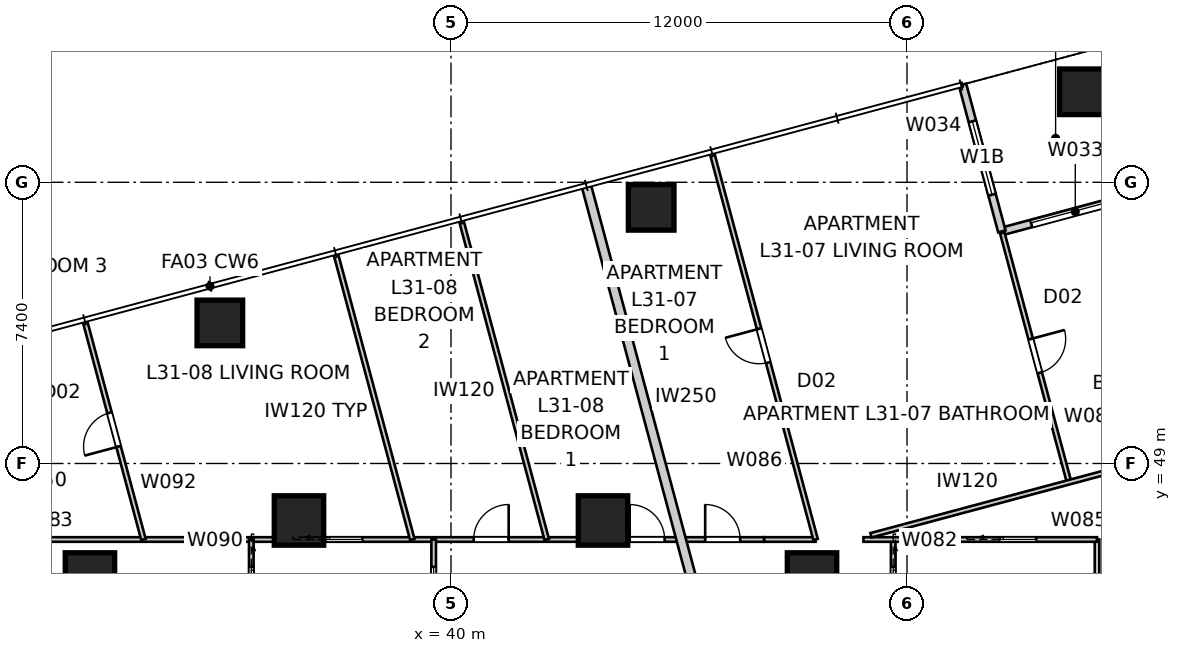
"""IFC4 building model, lengths in metres.
Left out: names, types, materials, properties, quantities, classifications, styles, units other than length and angle.
Written with IfcOpenShell. Run it as: python <this file> out.ifc"""

import sys

from ifc_helpers import new_model, si_unit, direction, frame, frame_2d, origin, origin_2d, place, context, subcontext, project, spatial, rectangle, extrude, element, fill, save


model = new_model("IFC4")
c1 = context("Model", 3, precision=1e-05, world=origin(), true_north=direction((0.0, 1.0)))
c2 = subcontext(c1, "Body", "Model", "MODEL_VIEW")
j1 = project(units=[si_unit("LENGTHUNIT", "METRE"), si_unit("PLANEANGLEUNIT", "RADIAN")], contexts=[c1])
p1 = place(None, origin())
s1 = spatial("IfcSite", under=j1, at=p1, CompositionType="ELEMENT")
p2 = place(p1, origin())
s2 = spatial("IfcBuilding", under=s1, at=p2, CompositionType="ELEMENT")
p3 = place(p2, frame((0.0, 0.0, 115.0)))
s3 = spatial("IfcBuildingStorey", under=s2, at=p3, CompositionType="ELEMENT", Elevation=115.0)
for number, where, z_axis, x_axis in (
    (1, (56.617, 58.781, 0.0), (0.0, 0.0, 1.0), (1.0, 0.0, 0.0)),
    (2, (45.267, 55.74, 0.0), (0.0, 0.0, 1.0), (1.0, 0.0, 0.0)),
    (3, (33.918, 52.699, 0.0), (0.0, 0.0, 1.0), (1.0, 0.0, 0.0)),
):
    element("IfcColumn", number, at=place(p3, frame(where, z_axis=z_axis, x_axis=x_axis)), inside=s3, PredefinedType="COLUMN", context=c2, shape_type="SweptSolid", body=[
        extrude(rectangle(XDim=1.2, YDim=1.2, at=origin_2d()), origin(), (0.0, 0.0, 1.0), 3.4),
    ])
for number, where, z_axis, x_axis in (
    (4, (49.5, 46.0, 0.0), (0.0, 0.0, 1.0), (1.0, 0.0, 0.0)),
    (5, (44.0, 47.5, 0.0), (0.0, 0.0, 1.0), (1.0, 0.0, 0.0)),
    (6, (36.0, 47.5, 0.0), (0.0, 0.0, 1.0), (1.0, 0.0, 0.0)),
    (7, (30.5, 46.0, 0.0), (0.0, 0.0, 1.0), (1.0, 0.0, 0.0)),
):
    element("IfcColumn", number, at=place(p3, frame(where, z_axis=z_axis, x_axis=x_axis)), inside=s3, PredefinedType="COLUMN", context=c2, shape_type="SweptSolid", body=[
        extrude(rectangle(XDim=1.3, YDim=1.3, at=origin_2d()), origin(), (0.0, 0.0, 1.0), 3.4),
    ])
p4 = place(p3, frame((58.359, 56.143, 0.0), z_axis=(0.0, 0.0, 1.0), x_axis=(-0.965919172068, -0.258843877716, 0.0)))
e8 = element("IfcWall", 8, at=p4, inside=s3, PredefinedType="SOLIDWALL", context=c2, shape_type="SweptSolid", body=[
    extrude(rectangle(XDim=4.0, YDim=0.2, at=frame_2d((2.0, 0.0))), origin(), (0.0, 0.0, 1.0), 3.25),
])
p5 = place(p4, frame((0.8, 0.0, 0.0)))
e9 = element("IfcOpeningElement", 9, at=p5, cuts=e8, PredefinedType="OPENING", context=c2, shape_type="SweptSolid", body=[
    extrude(rectangle(XDim=2.4, YDim=2.1, at=frame_2d((1.2, 1.05))), frame((0.0, 0.11, 0.0), z_axis=(0.0, -1.0, 0.0), x_axis=(1.0, 0.0, 0.0)), (0.0, 0.0, 1.0), 0.22),
])
p6 = place(p3, frame((54.496, 55.107, 0.0), z_axis=(0.0, 0.0, 1.0), x_axis=(-0.258786931944, 0.965934430412, 0.0)))
e10 = element("IfcWall", 10, at=p6, inside=s3, PredefinedType="SOLIDWALL", context=c2, shape_type="SweptSolid", body=[
    extrude(rectangle(XDim=4.0, YDim=0.2, at=frame_2d((2.0, 0.0))), origin(), (0.0, 0.0, 1.0), 3.25),
])
p7 = place(p6, frame((1.0, 0.0, 0.45)))
e11 = element("IfcOpeningElement", 11, at=p7, cuts=e10, PredefinedType="OPENING", context=c2, shape_type="SweptSolid", body=[
    extrude(rectangle(XDim=2.0, YDim=1.8, at=frame_2d((1.0, 0.9))), frame((0.0, 0.11, 0.0), z_axis=(0.0, -1.0, 0.0), x_axis=(1.0, 0.0, 0.0)), (0.0, 0.0, 1.0), 0.22),
])
p8 = place(p3, frame((43.56, 56.318, 0.0), z_axis=(0.0, 0.0, 1.0), x_axis=(0.258824223352, -0.965924438766, 0.0)))
e12 = element("IfcWall", 12, at=p8, inside=s3, PredefinedType="PARTITIONING", context=c2, shape_type="SweptSolid", body=[
    extrude(rectangle(XDim=12.138, YDim=0.25, at=frame_2d((6.069, 0.0))), origin(), (0.0, 0.0, 1.0), 3.25),
])
p9 = place(p3, frame((61.012, 46.242, 0.0), z_axis=(0.0, 0.0, 1.0), x_axis=(-0.965929355837, -0.25880587229, 0.0)))
e13 = element("IfcWall", 13, at=p9, inside=s3, PredefinedType="PARTITIONING", context=c2, shape_type="SweptSolid", body=[
    extrude(rectangle(XDim=6.645, YDim=0.25, at=frame_2d((3.322, 0.0))), origin(), (0.0, 0.0, 1.0), 3.25),
])
p10 = place(p3, frame((57.0, 47.0, 0.0), z_axis=(0.0, 0.0, 1.0), x_axis=(0.0, -1.0, 0.0)))
e14 = element("IfcWall", 14, at=p10, inside=s3, PredefinedType="PARTITIONING", context=c2, shape_type="SweptSolid", body=[
    extrude(rectangle(XDim=34.0, YDim=0.12, at=frame_2d((17.0, 0.0))), origin(), (0.0, 0.0, 1.0), 2.55),
])
p11 = place(p10, frame((8.23, 0.0, 0.0)))
e15 = element("IfcOpeningElement", 15, at=p11, cuts=e14, PredefinedType="OPENING", context=c2, shape_type="SweptSolid", body=[
    extrude(rectangle(XDim=0.92, YDim=2.34, at=frame_2d((0.46, 1.17))), frame((0.0, 0.07, 0.0), z_axis=(0.0, -1.0, 0.0), x_axis=(1.0, 0.0, 0.0)), (0.0, 0.0, 1.0), 0.14),
])
p12 = place(p10, frame((3.192, 0.0, 0.0)))
e16 = element("IfcOpeningElement", 16, at=p12, cuts=e14, PredefinedType="OPENING", context=c2, shape_type="SweptSolid", body=[
    extrude(rectangle(XDim=0.92, YDim=2.34, at=frame_2d((0.46, 1.17))), frame((0.0, 0.07, 0.0), z_axis=(0.0, -1.0, 0.0), x_axis=(1.0, 0.0, 0.0)), (0.0, 0.0, 1.0), 0.14),
])
p13 = place(p10, frame((24.391, 0.0, 0.0)))
e17 = element("IfcOpeningElement", 17, at=p13, cuts=e14, PredefinedType="OPENING", context=c2, shape_type="SweptSolid", body=[
    extrude(rectangle(XDim=0.92, YDim=2.34, at=frame_2d((0.46, 1.17))), frame((0.0, 0.07, 0.0), z_axis=(0.0, -1.0, 0.0), x_axis=(1.0, 0.0, 0.0)), (0.0, 0.0, 1.0), 0.14),
])
p14 = place(p10, frame((21.702, 0.0, 0.0)))
e18 = element("IfcOpeningElement", 18, at=p14, cuts=e14, PredefinedType="OPENING", context=c2, shape_type="SweptSolid", body=[
    extrude(rectangle(XDim=0.92, YDim=2.34, at=frame_2d((0.46, 1.17))), frame((0.0, 0.07, 0.0), z_axis=(0.0, -1.0, 0.0), x_axis=(1.0, 0.0, 0.0)), (0.0, 0.0, 1.0), 0.14),
])
p15 = place(p10, frame((31.459, 0.0, 0.0)))
e19 = element("IfcOpeningElement", 19, at=p15, cuts=e14, PredefinedType="OPENING", context=c2, shape_type="SweptSolid", body=[
    extrude(rectangle(XDim=0.96, YDim=2.1, at=frame_2d((0.48, 1.05))), frame((0.0, 0.07, 0.0), z_axis=(0.0, -1.0, 0.0), x_axis=(1.0, 0.0, 0.0)), (0.0, 0.0, 1.0), 0.14),
])
p16 = place(p10, frame((13.759, 0.0, 0.0)))
e20 = element("IfcOpeningElement", 20, at=p16, cuts=e14, PredefinedType="OPENING", context=c2, shape_type="SweptSolid", body=[
    extrude(rectangle(XDim=0.96, YDim=2.1, at=frame_2d((0.48, 1.05))), frame((0.0, 0.07, 0.0), z_axis=(0.0, -1.0, 0.0), x_axis=(1.0, 0.0, 0.0)), (0.0, 0.0, 1.0), 0.14),
])
p17 = place(p3, frame((51.636, 47.0, 0.0), z_axis=(0.0, 0.0, 1.0), x_axis=(0.0, -1.0, 0.0)))
e21 = element("IfcWall", 21, at=p17, inside=s3, PredefinedType="PARTITIONING", context=c2, shape_type="SweptSolid", body=[
    extrude(rectangle(XDim=2.4, YDim=0.12, at=frame_2d((1.2, 0.0))), origin(), (0.0, 0.0, 1.0), 3.25),
])
p18 = place(p17, frame((0.72, 0.0, 0.0)))
e22 = element("IfcOpeningElement", 22, at=p18, cuts=e21, PredefinedType="OPENING", context=c2, shape_type="SweptSolid", body=[
    extrude(rectangle(XDim=0.96, YDim=2.1, at=frame_2d((0.48, 1.05))), frame((0.0, 0.07, 0.0), z_axis=(0.0, -1.0, 0.0), x_axis=(1.0, 0.0, 0.0)), (0.0, 0.0, 1.0), 0.14),
])
p19 = place(p3, frame((23.0, 47.0, 0.0), z_axis=(0.0, 0.0, 1.0), x_axis=(1.0, 0.0, 0.0)))
e23 = element("IfcWall", 23, at=p19, inside=s3, PredefinedType="PARTITIONING", context=c2, shape_type="SweptSolid", body=[
    extrude(rectangle(XDim=25.241, YDim=0.12, at=frame_2d((12.62, 0.0))), origin(), (0.0, 0.0, 1.0), 2.55),
])
p20 = place(p19, frame((21.702, 0.0, 0.0)))
e24 = element("IfcOpeningElement", 24, at=p20, cuts=e23, PredefinedType="OPENING", context=c2, shape_type="SweptSolid", body=[
    extrude(rectangle(XDim=0.92, YDim=2.34, at=frame_2d((0.46, 1.17))), frame((0.0, 0.07, 0.0), z_axis=(0.0, -1.0, 0.0), x_axis=(1.0, 0.0, 0.0)), (0.0, 0.0, 1.0), 0.14),
])
p21 = place(p19, frame((17.598, 0.0, 0.0)))
e25 = element("IfcOpeningElement", 25, at=p21, cuts=e23, PredefinedType="OPENING", context=c2, shape_type="SweptSolid", body=[
    extrude(rectangle(XDim=0.92, YDim=2.34, at=frame_2d((0.46, 1.17))), frame((0.0, 0.07, 0.0), z_axis=(0.0, -1.0, 0.0), x_axis=(1.0, 0.0, 0.0)), (0.0, 0.0, 1.0), 0.14),
])
p22 = place(p19, frame((23.689, 0.0, 0.0)))
e26 = element("IfcOpeningElement", 26, at=p22, cuts=e23, PredefinedType="OPENING", context=c2, shape_type="SweptSolid", body=[
    extrude(rectangle(XDim=0.92, YDim=2.34, at=frame_2d((0.46, 1.17))), frame((0.0, 0.07, 0.0), z_axis=(0.0, -1.0, 0.0), x_axis=(1.0, 0.0, 0.0)), (0.0, 0.0, 1.0), 0.14),
])
p23 = place(p19, frame((2.225, 0.0, 0.0)))
e27 = element("IfcOpeningElement", 27, at=p23, cuts=e23, PredefinedType="OPENING", context=c2, shape_type="SweptSolid", body=[
    extrude(rectangle(XDim=0.92, YDim=2.34, at=frame_2d((0.46, 1.17))), frame((0.0, 0.07, 0.0), z_axis=(0.0, -1.0, 0.0), x_axis=(1.0, 0.0, 0.0)), (0.0, 0.0, 1.0), 0.14),
])
p24 = place(p19, frame((13.709, 0.0, 0.0)))
e28 = element("IfcOpeningElement", 28, at=p24, cuts=e23, PredefinedType="OPENING", context=c2, shape_type="SweptSolid", body=[
    extrude(rectangle(XDim=0.96, YDim=2.1, at=frame_2d((0.48, 1.05))), frame((0.0, 0.07, 0.0), z_axis=(0.0, -1.0, 0.0), x_axis=(1.0, 0.0, 0.0)), (0.0, 0.0, 1.0), 0.14),
])
p25 = place(p3, frame((50.853, 47.0, 0.0), z_axis=(0.0, 0.0, 1.0), x_axis=(1.0, 0.0, 0.0)))
e29 = element("IfcWall", 29, at=p25, inside=s3, PredefinedType="PARTITIONING", context=c2, shape_type="SweptSolid", body=[
    extrude(rectangle(XDim=6.147, YDim=0.12, at=frame_2d((3.074, 0.0))), origin(), (0.0, 0.0, 1.0), 3.25),
])
p26 = place(p25, frame((3.585, 0.0, 0.0)))
e30 = element("IfcOpeningElement", 30, at=p26, cuts=e29, PredefinedType="OPENING", context=c2, shape_type="SweptSolid", body=[
    extrude(rectangle(XDim=0.96, YDim=2.1, at=frame_2d((0.48, 1.05))), frame((0.0, 0.07, 0.0), z_axis=(0.0, -1.0, 0.0), x_axis=(1.0, 0.0, 0.0)), (0.0, 0.0, 1.0), 0.14),
])
p27 = place(p3, frame((49.594, 47.0, 0.0), z_axis=(0.0, 0.0, 1.0), x_axis=(-0.258797552287, 0.965931585015, 0.0)))
e31 = element("IfcWall", 31, at=p27, inside=s3, PredefinedType="PARTITIONING", context=c2, shape_type="SweptSolid", body=[
    extrude(rectangle(XDim=10.522, YDim=0.12, at=frame_2d((5.261, 0.0))), origin(), (0.0, 0.0, 1.0), 2.722),
])
p28 = place(p27, frame((4.821, 0.0, 0.0)))
e32 = element("IfcOpeningElement", 32, at=p28, cuts=e31, PredefinedType="OPENING", context=c2, shape_type="SweptSolid", body=[
    extrude(rectangle(XDim=0.92, YDim=2.34, at=frame_2d((0.46, 1.17))), frame((0.0, 0.07, 0.0), z_axis=(0.0, -1.0, 0.0), x_axis=(1.0, 0.0, 0.0)), (0.0, 0.0, 1.0), 0.14),
])
p29 = place(p3, frame((54.506, 55.069, 0.0), z_axis=(0.0, 0.0, 1.0), x_axis=(0.258830095464, -0.965922865286, 0.0)))
e33 = element("IfcWall", 33, at=p29, inside=s3, PredefinedType="PARTITIONING", context=c2, shape_type="SweptSolid", body=[
    extrude(rectangle(XDim=6.793, YDim=0.12, at=frame_2d((3.396, 0.0))), origin(), (0.0, 0.0, 1.0), 3.25),
])
p30 = place(p29, frame((2.892, 0.0, 0.0)))
e34 = element("IfcOpeningElement", 34, at=p30, cuts=e33, PredefinedType="OPENING", context=c2, shape_type="SweptSolid", body=[
    extrude(rectangle(XDim=0.92, YDim=2.34, at=frame_2d((0.46, 1.17))), frame((0.0, 0.07, 0.0), z_axis=(0.0, -1.0, 0.0), x_axis=(1.0, 0.0, 0.0)), (0.0, 0.0, 1.0), 0.14),
])
p31 = place(p3, frame((60.089, 49.532, 0.0), z_axis=(0.0, 0.0, 1.0), x_axis=(-0.965927203676, -0.25881390457, 0.0)))
e35 = element("IfcWall", 35, at=p31, inside=s3, PredefinedType="PARTITIONING", context=c2, shape_type="SweptSolid", body=[
    extrude(rectangle(XDim=9.357, YDim=0.12, at=frame_2d((4.678, 0.0))), origin(), (0.0, 0.0, 1.0), 2.638),
])
p32 = place(p3, frame((39.544, 44.6, 0.0), z_axis=(0.0, 0.0, 1.0), x_axis=(0.0, 1.0, 0.0)))
e36 = element("IfcWall", 36, at=p32, inside=s3, PredefinedType="PARTITIONING", context=c2, shape_type="SweptSolid", body=[
    extrude(rectangle(XDim=2.4, YDim=0.12, at=frame_2d((1.2, 0.0))), origin(), (0.0, 0.0, 1.0), 3.25),
])
p33 = place(p32, frame((0.72, 0.0, 0.0)))
e37 = element("IfcOpeningElement", 37, at=p33, cuts=e36, PredefinedType="OPENING", context=c2, shape_type="SweptSolid", body=[
    extrude(rectangle(XDim=0.96, YDim=2.1, at=frame_2d((0.48, 1.05))), frame((0.0, 0.07, 0.0), z_axis=(0.0, -1.0, 0.0), x_axis=(1.0, 0.0, 0.0)), (0.0, 0.0, 1.0), 0.14),
])
p34 = place(p3, frame((34.745, 47.0, 0.0), z_axis=(0.0, 0.0, 1.0), x_axis=(0.0, -1.0, 0.0)))
e38 = element("IfcWall", 38, at=p34, inside=s3, PredefinedType="PARTITIONING", context=c2, shape_type="SweptSolid", body=[
    extrude(rectangle(XDim=2.4, YDim=0.12, at=frame_2d((1.2, 0.0))), origin(), (0.0, 0.0, 1.0), 3.25),
])
p35 = place(p34, frame((0.72, 0.0, 0.0)))
e39 = element("IfcOpeningElement", 39, at=p35, cuts=e38, PredefinedType="OPENING", context=c2, shape_type="SweptSolid", body=[
    extrude(rectangle(XDim=0.96, YDim=2.1, at=frame_2d((0.48, 1.05))), frame((0.0, 0.07, 0.0), z_axis=(0.0, -1.0, 0.0), x_axis=(1.0, 0.0, 0.0)), (0.0, 0.0, 1.0), 0.14),
])
p36 = place(p3, frame((36.969, 54.511, 0.0), z_axis=(0.0, 0.0, 1.0), x_axis=(0.258813509689, -0.965927309482, 0.0)))
e40 = element("IfcWall", 40, at=p36, inside=s3, PredefinedType="PARTITIONING", context=c2, shape_type="SweptSolid", body=[
    extrude(rectangle(XDim=7.776, YDim=0.12, at=frame_2d((3.888, 0.0))), origin(), (0.0, 0.0, 1.0), 3.25),
])
p37 = place(p3, frame((31.908, 47.0, 0.0), z_axis=(0.0, 0.0, 1.0), x_axis=(-0.258812722515, 0.965927520399, 0.0)))
e41 = element("IfcWall", 41, at=p37, inside=s3, PredefinedType="PARTITIONING", context=c2, shape_type="SweptSolid", body=[
    extrude(rectangle(XDim=5.945, YDim=0.12, at=frame_2d((2.972, 0.0))), origin(), (0.0, 0.0, 1.0), 3.25),
])
p38 = place(p37, frame((2.532, 0.0, 0.0)))
e42 = element("IfcOpeningElement", 42, at=p38, cuts=e41, PredefinedType="OPENING", context=c2, shape_type="SweptSolid", body=[
    extrude(rectangle(XDim=0.92, YDim=2.34, at=frame_2d((0.46, 1.17))), frame((0.0, 0.07, 0.0), z_axis=(0.0, -1.0, 0.0), x_axis=(1.0, 0.0, 0.0)), (0.0, 0.0, 1.0), 0.14),
])
p39 = place(p3, frame((42.519, 47.0, 0.0), z_axis=(0.0, 0.0, 1.0), x_axis=(-0.258819860698, 0.965925607751, 0.0)))
e43 = element("IfcWall", 43, at=p39, inside=s3, PredefinedType="PARTITIONING", context=c2, shape_type="SweptSolid", body=[
    extrude(rectangle(XDim=8.691, YDim=0.12, at=frame_2d((4.346, 0.0))), origin(), (0.0, 0.0, 1.0), 3.25),
])
p40 = place(p3, frame((48.241, 47.0, 0.0), z_axis=(0.0, 0.0, 1.0), x_axis=(1.0, 0.0, 0.0)))
e44 = element("IfcWall", 44, at=p40, inside=s3, PredefinedType="PARTITIONING", context=c2, shape_type="SweptSolid", body=[
    extrude(rectangle(XDim=1.353, YDim=0.12, at=frame_2d((0.676, 0.0))), origin(), (0.0, 0.0, 1.0), 3.25),
])
p41 = place(p5, origin())
e45 = element("IfcDoor", 45, at=p41, inside=s3, OperationType="SLIDING_TO_LEFT", PredefinedType="DOOR", context=c2, shape_type="SweptSolid", body=[
    extrude(rectangle(XDim=2.4, YDim=2.1, at=frame_2d((1.2, 1.05))), frame((0.0, 0.025, 0.0), z_axis=(0.0, -1.0, 0.0), x_axis=(1.0, 0.0, 0.0)), (0.0, 0.0, 1.0), 0.05),
])
fill(e9, e45)
p42 = place(p7, origin())
e46 = element("IfcWindow", 46, at=p42, inside=s3, PartitioningType="SINGLE_PANEL", PredefinedType="WINDOW", context=c2, shape_type="SweptSolid", body=[
    extrude(rectangle(XDim=2.0, YDim=1.8, at=frame_2d((1.0, 0.9))), frame((0.0, 0.03, 0.0), z_axis=(0.0, -1.0, 0.0), x_axis=(1.0, 0.0, 0.0)), (0.0, 0.0, 1.0), 0.06),
])
fill(e11, e46)
p43 = place(p20, origin())
e47 = element("IfcDoor", 47, at=p43, inside=s3, OperationType="SINGLE_SWING_LEFT", PredefinedType="DOOR", context=c2, shape_type="SweptSolid", body=[
    extrude(rectangle(XDim=0.92, YDim=2.34, at=frame_2d((0.46, 1.17))), frame((0.0, 0.025, 0.0), z_axis=(0.0, -1.0, 0.0), x_axis=(1.0, 0.0, 0.0)), (0.0, 0.0, 1.0), 0.05),
])
fill(e24, e47)
p44 = place(p21, origin())
e48 = element("IfcDoor", 48, at=p44, inside=s3, OperationType="SINGLE_SWING_RIGHT", PredefinedType="DOOR", context=c2, shape_type="SweptSolid", body=[
    extrude(rectangle(XDim=0.92, YDim=2.34, at=frame_2d((0.46, 1.17))), frame((0.0, 0.025, 0.0), z_axis=(0.0, -1.0, 0.0), x_axis=(1.0, 0.0, 0.0)), (0.0, 0.0, 1.0), 0.05),
])
fill(e25, e48)
p45 = place(p33, origin())
e49 = element("IfcDoor", 49, at=p45, inside=s3, OperationType="SLIDING_TO_LEFT", PredefinedType="DOOR", context=c2, shape_type="SweptSolid", body=[
    extrude(rectangle(XDim=0.96, YDim=2.1, at=frame_2d((0.48, 1.05))), frame((0.0, 0.025, 0.0), z_axis=(0.0, -1.0, 0.0), x_axis=(1.0, 0.0, 0.0)), (0.0, 0.0, 1.0), 0.05),
])
fill(e37, e49)
p46 = place(p18, origin())
e50 = element("IfcDoor", 50, at=p46, inside=s3, OperationType="SLIDING_TO_LEFT", PredefinedType="DOOR", context=c2, shape_type="SweptSolid", body=[
    extrude(rectangle(XDim=0.96, YDim=2.1, at=frame_2d((0.48, 1.05))), frame((0.0, 0.025, 0.0), z_axis=(0.0, -1.0, 0.0), x_axis=(1.0, 0.0, 0.0)), (0.0, 0.0, 1.0), 0.05),
])
fill(e22, e50)
p47 = place(p22, origin())
e51 = element("IfcDoor", 51, at=p47, inside=s3, OperationType="SINGLE_SWING_LEFT", PredefinedType="DOOR", context=c2, shape_type="SweptSolid", body=[
    extrude(rectangle(XDim=0.92, YDim=2.34, at=frame_2d((0.46, 1.17))), frame((0.0, 0.025, 0.0), z_axis=(0.0, -1.0, 0.0), x_axis=(1.0, 0.0, 0.0)), (0.0, 0.0, 1.0), 0.05),
])
fill(e26, e51)
p48 = place(p24, origin())
e52 = element("IfcDoor", 52, at=p48, inside=s3, OperationType="SLIDING_TO_LEFT", PredefinedType="DOOR", context=c2, shape_type="SweptSolid", body=[
    extrude(rectangle(XDim=0.96, YDim=2.1, at=frame_2d((0.48, 1.05))), frame((0.0, 0.025, 0.0), z_axis=(0.0, -1.0, 0.0), x_axis=(1.0, 0.0, 0.0)), (0.0, 0.0, 1.0), 0.05),
])
fill(e28, e52)
p49 = place(p35, origin())
e53 = element("IfcDoor", 53, at=p49, inside=s3, OperationType="SLIDING_TO_LEFT", PredefinedType="DOOR", context=c2, shape_type="SweptSolid", body=[
    extrude(rectangle(XDim=0.96, YDim=2.1, at=frame_2d((0.48, 1.05))), frame((0.0, 0.025, 0.0), z_axis=(0.0, -1.0, 0.0), x_axis=(1.0, 0.0, 0.0)), (0.0, 0.0, 1.0), 0.05),
])
fill(e39, e53)
p50 = place(p26, origin())
e54 = element("IfcDoor", 54, at=p50, inside=s3, OperationType="SLIDING_TO_LEFT", PredefinedType="DOOR", context=c2, shape_type="SweptSolid", body=[
    extrude(rectangle(XDim=0.96, YDim=2.1, at=frame_2d((0.48, 1.05))), frame((0.0, 0.025, 0.0), z_axis=(0.0, -1.0, 0.0), x_axis=(1.0, 0.0, 0.0)), (0.0, 0.0, 1.0), 0.05),
])
fill(e30, e54)
p51 = place(p38, origin())
e55 = element("IfcDoor", 55, at=p51, inside=s3, OperationType="SINGLE_SWING_LEFT", PredefinedType="DOOR", context=c2, shape_type="SweptSolid", body=[
    extrude(rectangle(XDim=0.92, YDim=2.34, at=frame_2d((0.46, 1.17))), frame((0.0, 0.025, 0.0), z_axis=(0.0, -1.0, 0.0), x_axis=(1.0, 0.0, 0.0)), (0.0, 0.0, 1.0), 0.05),
])
fill(e42, e55)
p52 = place(p28, origin())
e56 = element("IfcDoor", 56, at=p52, inside=s3, OperationType="SINGLE_SWING_RIGHT", PredefinedType="DOOR", context=c2, shape_type="SweptSolid", body=[
    extrude(rectangle(XDim=0.92, YDim=2.34, at=frame_2d((0.46, 1.17))), frame((0.0, 0.025, 0.0), z_axis=(0.0, -1.0, 0.0), x_axis=(1.0, 0.0, 0.0)), (0.0, 0.0, 1.0), 0.05),
])
fill(e32, e56)
p53 = place(p30, origin())
e57 = element("IfcDoor", 57, at=p53, inside=s3, OperationType="SINGLE_SWING_LEFT", PredefinedType="DOOR", context=c2, shape_type="SweptSolid", body=[
    extrude(rectangle(XDim=0.92, YDim=2.34, at=frame_2d((0.46, 1.17))), frame((0.0, 0.025, 0.0), z_axis=(0.0, -1.0, 0.0), x_axis=(1.0, 0.0, 0.0)), (0.0, 0.0, 1.0), 0.05),
])
fill(e34, e57)
save(model, sys.argv[1])
